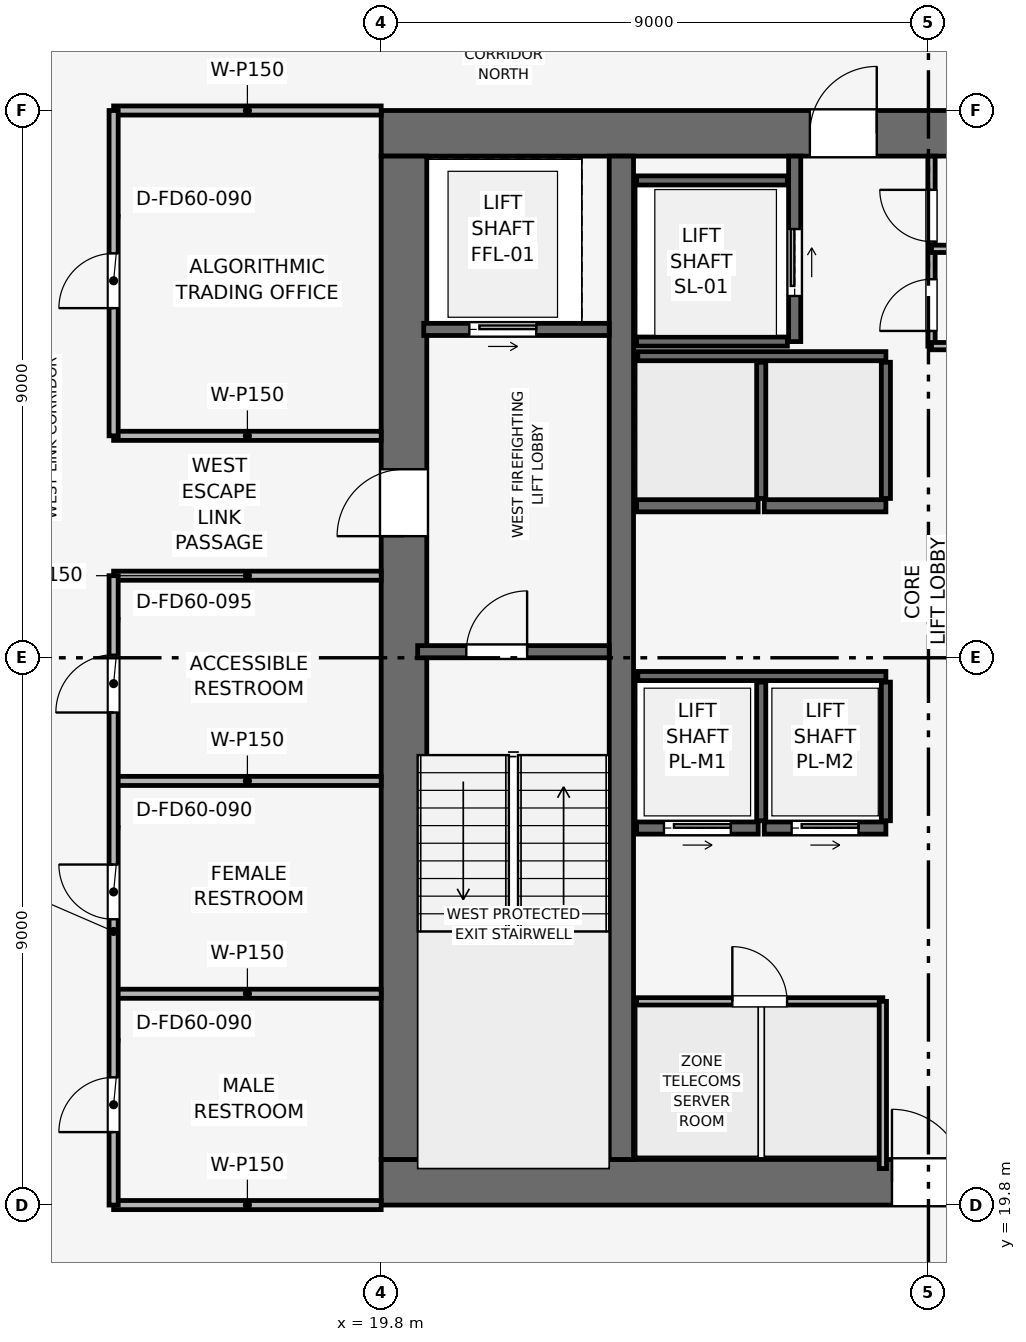
"""IFC4 building model, lengths in metres.
Left out: names, types, materials, properties, quantities, classifications, styles, units other than length and angle.
Written with IfcOpenShell. Run it as: python <this file> out.ifc"""

import sys

from ifc_helpers import new_model, si_unit, direction, frame, frame_2d, origin, place, context, subcontext, project, spatial, rectangle, extrude, element, fill, save


model = new_model("IFC4")
c1 = context("Model", 3, precision=1e-05, world=origin(), true_north=direction((0.0, 1.0)))
c2 = subcontext(c1, "Body", "Model", "MODEL_VIEW")
j1 = project(units=[si_unit("LENGTHUNIT", "METRE"), si_unit("PLANEANGLEUNIT", "RADIAN")], contexts=[c1])
p1 = place(None, origin())
s1 = spatial("IfcSite", under=j1, at=p1, CompositionType="ELEMENT")
p2 = place(p1, origin())
s2 = spatial("IfcBuilding", under=s1, at=p2, CompositionType="ELEMENT")
p3 = place(p2, frame((0.0, 0.0, 233.7)))
s3 = spatial("IfcBuildingStorey", under=s2, at=p3, CompositionType="ELEMENT", Elevation=233.7)
p4 = place(p3, frame((19.8, 20.175, 0.0), z_axis=(0.0, 0.0, 1.0), x_axis=(1.0, 0.0, 0.0)))
e1 = element("IfcWall", 1, at=p4, inside=s3, PredefinedType="SHEAR", context=c2, shape_type="SweptSolid", body=[
    extrude(rectangle(XDim=18.0, YDim=0.75, at=frame_2d((9.0, 0.0))), origin(), (0.0, 0.0, 1.0), 3.75),
])
p5 = place(p4, frame((8.4, 0.0, 0.0)))
e2 = element("IfcOpeningElement", 2, at=p5, cuts=e1, PredefinedType="OPENING", context=c2, shape_type="SweptSolid", body=[
    extrude(rectangle(XDim=1.2, YDim=2.2, at=frame_2d((0.6, 1.1))), frame((0.0, 0.385, 0.0), z_axis=(0.0, -1.0, 0.0), x_axis=(1.0, 0.0, 0.0)), (0.0, 0.0, 1.0), 0.77),
])
p6 = place(p3, frame((19.8, 37.425, 0.0), z_axis=(0.0, 0.0, 1.0), x_axis=(1.0, 0.0, 0.0)))
e3 = element("IfcWall", 3, at=p6, inside=s3, PredefinedType="SHEAR", context=c2, shape_type="SweptSolid", body=[
    extrude(rectangle(XDim=18.0, YDim=0.75, at=frame_2d((9.0, 0.0))), origin(), (0.0, 0.0, 1.0), 3.75),
])
p7 = place(p6, frame((7.05, 0.0, 0.0)))
e4 = element("IfcOpeningElement", 4, at=p7, cuts=e3, PredefinedType="OPENING", context=c2, shape_type="SweptSolid", body=[
    extrude(rectangle(XDim=1.1, YDim=2.15, at=frame_2d((0.55, 1.075))), frame((0.0, 0.385, 0.0), z_axis=(0.0, -1.0, 0.0), x_axis=(1.0, 0.0, 0.0)), (0.0, 0.0, 1.0), 0.77),
])
p8 = place(p3, frame((20.175, 20.55, 0.0), z_axis=(0.0, 0.0, 1.0), x_axis=(0.0, 1.0, 0.0)))
e5 = element("IfcWall", 5, at=p8, inside=s3, PredefinedType="SHEAR", context=c2, shape_type="SweptSolid", body=[
    extrude(rectangle(XDim=16.5, YDim=0.75, at=frame_2d((8.25, 0.0))), origin(), (0.0, 0.0, 1.0), 3.75),
])
p9 = place(p8, frame((10.25, 0.0, 0.0)))
e6 = element("IfcOpeningElement", 6, at=p9, cuts=e5, PredefinedType="OPENING", context=c2, shape_type="SweptSolid", body=[
    extrude(rectangle(XDim=1.1, YDim=2.15, at=frame_2d((0.55, 1.075))), frame((0.0, 0.385, 0.0), z_axis=(0.0, -1.0, 0.0), x_axis=(1.0, 0.0, 0.0)), (0.0, 0.0, 1.0), 0.77),
])
p10 = place(p3, frame((23.75, 20.55, 0.0), z_axis=(0.0, 0.0, 1.0), x_axis=(0.0, 1.0, 0.0)))
e7 = element("IfcWall", 7, at=p10, inside=s3, PredefinedType="SHEAR", context=c2, shape_type="SweptSolid", body=[
    extrude(rectangle(XDim=16.5, YDim=0.4, at=frame_2d((8.25, 0.0))), origin(), (0.0, 0.0, 1.0), 3.75),
])
p11 = place(p3, frame((20.4, 28.9, 0.0), z_axis=(0.0, 0.0, 1.0), x_axis=(1.0, 0.0, 0.0)))
e8 = element("IfcWall", 8, at=p11, inside=s3, PredefinedType="SHEAR", context=c2, shape_type="SweptSolid", body=[
    extrude(rectangle(XDim=3.15, YDim=0.2, at=frame_2d((1.575, 0.0))), origin(), (0.0, 0.0, 1.0), 3.5),
])
p12 = place(p11, frame((0.8, 0.0, 0.0)))
e9 = element("IfcOpeningElement", 9, at=p12, cuts=e8, PredefinedType="OPENING", context=c2, shape_type="SweptSolid", body=[
    extrude(rectangle(XDim=1.0, YDim=2.1, at=frame_2d((0.5, 1.05))), frame((0.0, 0.11, 0.0), z_axis=(0.0, -1.0, 0.0), x_axis=(1.0, 0.0, 0.0)), (0.0, 0.0, 1.0), 0.22),
])
p13 = place(p3, frame((20.5, 34.2, 0.0), z_axis=(0.0, 0.0, 1.0), x_axis=(1.0, 0.0, 0.0)))
e10 = element("IfcWall", 10, at=p13, inside=s3, PredefinedType="SHEAR", context=c2, shape_type="SweptSolid", body=[
    extrude(rectangle(XDim=3.05, YDim=0.2, at=frame_2d((1.525, 0.0))), origin(), (0.0, 0.0, 1.0), 3.5),
])
p14 = place(p13, frame((0.75, 0.0, 0.0)))
e11 = element("IfcOpeningElement", 11, at=p14, cuts=e10, PredefinedType="OPENING", context=c2, shape_type="SweptSolid", body=[
    extrude(rectangle(XDim=1.1, YDim=2.15, at=frame_2d((0.55, 1.075))), frame((0.0, 0.11, 0.0), z_axis=(0.0, -1.0, 0.0), x_axis=(1.0, 0.0, 0.0)), (0.0, 0.0, 1.0), 0.22),
])
p15 = place(p3, frame((26.6, 34.0, 0.0), z_axis=(0.0, 0.0, 1.0), x_axis=(0.0, 1.0, 0.0)))
e12 = element("IfcWall", 12, at=p15, inside=s3, PredefinedType="SHEAR", context=c2, shape_type="SweptSolid", body=[
    extrude(rectangle(XDim=3.05, YDim=0.2, at=frame_2d((1.525, 0.0))), origin(), (0.0, 0.0, 1.0), 3.5),
])
p16 = place(p15, frame((0.75, 0.0, 0.0)))
e13 = element("IfcOpeningElement", 13, at=p16, cuts=e12, PredefinedType="OPENING", context=c2, shape_type="SweptSolid", body=[
    extrude(rectangle(XDim=1.1, YDim=2.15, at=frame_2d((0.55, 1.075))), frame((0.0, 0.11, 0.0), z_axis=(0.0, -1.0, 0.0), x_axis=(1.0, 0.0, 0.0)), (0.0, 0.0, 1.0), 0.22),
])
for number, where, z_axis, x_axis in (
    (14, (24.0, 34.0, 0.0), (0.0, 0.0, 1.0), (1.0, 0.0, 0.0)),
    (15, (24.0, 36.65, 0.0), (0.0, 0.0, 1.0), (1.0, 0.0, 0.0)),
):
    element("IfcWall", number, at=place(p3, frame(where, z_axis=z_axis, x_axis=x_axis)), inside=s3, PredefinedType="SHEAR", context=c2, shape_type="SweptSolid", body=[
        extrude(rectangle(XDim=2.48, YDim=0.15, at=frame_2d((1.24, 0.0))), origin(), (0.0, 0.0, 1.0), 3.5),
    ])
p17 = place(p3, frame((24.0, 26.0, 0.0), z_axis=(0.0, 0.0, 1.0), x_axis=(1.0, 0.0, 0.0)))
e16 = element("IfcWall", 16, at=p17, inside=s3, PredefinedType="SHEAR", context=c2, shape_type="SweptSolid", body=[
    extrude(rectangle(XDim=2.0, YDim=0.2, at=frame_2d((1.0, 0.0))), origin(), (0.0, 0.0, 1.0), 3.5),
])
p18 = place(p17, frame((0.45, 0.0, 0.0)))
e17 = element("IfcOpeningElement", 17, at=p18, cuts=e16, PredefinedType="OPENING", context=c2, shape_type="SweptSolid", body=[
    extrude(rectangle(XDim=1.1, YDim=2.15, at=frame_2d((0.55, 1.075))), frame((0.0, 0.11, 0.0), z_axis=(0.0, -1.0, 0.0), x_axis=(1.0, 0.0, 0.0)), (0.0, 0.0, 1.0), 0.22),
])
p19 = place(p3, frame((26.1, 26.0, 0.0), z_axis=(0.0, 0.0, 1.0), x_axis=(1.0, 0.0, 0.0)))
e18 = element("IfcWall", 18, at=p19, inside=s3, PredefinedType="SHEAR", context=c2, shape_type="SweptSolid", body=[
    extrude(rectangle(XDim=2.0, YDim=0.2, at=frame_2d((1.0, 0.0))), origin(), (0.0, 0.0, 1.0), 3.5),
])
p20 = place(p19, frame((0.45, 0.0, 0.0)))
e19 = element("IfcOpeningElement", 19, at=p20, cuts=e18, PredefinedType="OPENING", context=c2, shape_type="SweptSolid", body=[
    extrude(rectangle(XDim=1.1, YDim=2.15, at=frame_2d((0.55, 1.075))), frame((0.0, 0.11, 0.0), z_axis=(0.0, -1.0, 0.0), x_axis=(1.0, 0.0, 0.0)), (0.0, 0.0, 1.0), 0.22),
])
for number, where, z_axis, x_axis in (
    (20, (24.0, 31.3, 0.0), (0.0, 0.0, 1.0), (1.0, 0.0, 0.0)),
    (21, (26.1, 31.3, 0.0), (0.0, 0.0, 1.0), (1.0, 0.0, 0.0)),
):
    element("IfcWall", number, at=place(p3, frame(where, z_axis=z_axis, x_axis=x_axis)), inside=s3, PredefinedType="SHEAR", context=c2, shape_type="SweptSolid", body=[
        extrude(rectangle(XDim=2.0, YDim=0.2, at=frame_2d((1.0, 0.0))), origin(), (0.0, 0.0, 1.0), 3.5),
    ])
p21 = place(p3, frame((24.02, 28.5, 0.0), z_axis=(0.0, 0.0, 1.0), x_axis=(1.0, 0.0, 0.0)))
e22 = element("IfcWall", 22, at=p21, inside=s3, PredefinedType="SHEAR", context=c2, shape_type="SweptSolid", body=[
    extrude(rectangle(XDim=4.08, YDim=0.15, at=frame_2d((2.04, 0.0))), origin(), (0.0, 0.0, 1.0), 3.5),
])
for number, where, z_axis, x_axis in (
    (23, (26.05, 26.12, 0.0), (0.0, 0.0, 1.0), (0.0, 1.0, 0.0)),
    (24, (28.1, 26.12, 0.0), (0.0, 0.0, 1.0), (0.0, 1.0, 0.0)),
):
    element("IfcWall", number, at=place(p3, frame(where, z_axis=z_axis, x_axis=x_axis)), inside=s3, PredefinedType="SHEAR", context=c2, shape_type="SweptSolid", body=[
        extrude(rectangle(XDim=2.28, YDim=0.15, at=frame_2d((1.14, 0.0))), origin(), (0.0, 0.0, 1.0), 3.5),
    ])
p22 = place(p3, frame((24.02, 33.76, 0.0), z_axis=(0.0, 0.0, 1.0), x_axis=(1.0, 0.0, 0.0)))
e25 = element("IfcWall", 25, at=p22, inside=s3, PredefinedType="SHEAR", context=c2, shape_type="SweptSolid", body=[
    extrude(rectangle(XDim=4.08, YDim=0.15, at=frame_2d((2.04, 0.0))), origin(), (0.0, 0.0, 1.0), 3.5),
])
for number, where, z_axis, x_axis in (
    (26, (26.05, 31.42, 0.0), (0.0, 0.0, 1.0), (0.0, 1.0, 0.0)),
    (27, (28.1, 31.42, 0.0), (0.0, 0.0, 1.0), (0.0, 1.0, 0.0)),
):
    element("IfcWall", number, at=place(p3, frame(where, z_axis=z_axis, x_axis=x_axis)), inside=s3, PredefinedType="SHEAR", context=c2, shape_type="SweptSolid", body=[
        extrude(rectangle(XDim=2.24, YDim=0.15, at=frame_2d((1.12, 0.0))), origin(), (0.0, 0.0, 1.0), 3.5),
    ])
p23 = place(p3, frame((28.85, 33.925, 0.0), z_axis=(0.0, 0.0, 1.0), x_axis=(0.0, 1.0, 0.0)))
e28 = element("IfcWall", 28, at=p23, inside=s3, PredefinedType="PARTITIONING", context=c2, shape_type="SweptSolid", body=[
    extrude(rectangle(XDim=3.125, YDim=0.12, at=frame_2d((1.562, 0.0))), origin(), (0.0, 0.0, 1.0), 3.5),
])
p24 = place(p23, frame((0.25, 0.0, 0.0)))
e29 = element("IfcOpeningElement", 29, at=p24, cuts=e28, PredefinedType="OPENING", context=c2, shape_type="SweptSolid", body=[
    extrude(rectangle(XDim=0.85, YDim=2.1, at=frame_2d((0.425, 1.05))), frame((0.0, 0.07, 0.0), z_axis=(0.0, -1.0, 0.0), x_axis=(1.0, 0.0, 0.0)), (0.0, 0.0, 1.0), 0.14),
])
p25 = place(p23, frame((1.72, 0.0, 0.0)))
e30 = element("IfcOpeningElement", 30, at=p25, cuts=e28, PredefinedType="OPENING", context=c2, shape_type="SweptSolid", body=[
    extrude(rectangle(XDim=0.85, YDim=2.1, at=frame_2d((0.425, 1.05))), frame((0.0, 0.07, 0.0), z_axis=(0.0, -1.0, 0.0), x_axis=(1.0, 0.0, 0.0)), (0.0, 0.0, 1.0), 0.14),
])
for number, where, z_axis, x_axis in (
    (31, (28.85, 35.525, 0.0), (0.0, 0.0, 1.0), (1.0, 0.0, 0.0)),
    (32, (28.85, 33.925, 0.0), (0.0, 0.0, 1.0), (1.0, 0.0, 0.0)),
):
    element("IfcWall", number, at=place(p3, frame(where, z_axis=z_axis, x_axis=x_axis)), inside=s3, PredefinedType="PARTITIONING", context=c2, shape_type="SweptSolid", body=[
        extrude(rectangle(XDim=3.3, YDim=0.12, at=frame_2d((1.65, 0.0))), origin(), (0.0, 0.0, 1.0), 3.5),
    ])
p26 = place(p3, frame((24.0, 23.15, 0.0), z_axis=(0.0, 0.0, 1.0), x_axis=(1.0, 0.0, 0.0)))
e33 = element("IfcWall", 33, at=p26, inside=s3, PredefinedType="PARTITIONING", context=c2, shape_type="SweptSolid", body=[
    extrude(rectangle(XDim=4.05, YDim=0.12, at=frame_2d((2.025, 0.0))), origin(), (0.0, 0.0, 1.0), 3.5),
])
p27 = place(p26, frame((1.575, 0.0, 0.0)))
e34 = element("IfcOpeningElement", 34, at=p27, cuts=e33, PredefinedType="OPENING", context=c2, shape_type="SweptSolid", body=[
    extrude(rectangle(XDim=0.9, YDim=2.1, at=frame_2d((0.45, 1.05))), frame((0.0, 0.07, 0.0), z_axis=(0.0, -1.0, 0.0), x_axis=(1.0, 0.0, 0.0)), (0.0, 0.0, 1.0), 0.14),
])
p28 = place(p3, frame((28.05, 20.4, 0.0), z_axis=(0.0, 0.0, 1.0), x_axis=(0.0, 1.0, 0.0)))
e35 = element("IfcWall", 35, at=p28, inside=s3, PredefinedType="PARTITIONING", context=c2, shape_type="SweptSolid", body=[
    extrude(rectangle(XDim=2.75, YDim=0.12, at=frame_2d((1.375, 0.0))), origin(), (0.0, 0.0, 1.0), 3.5),
])
p29 = place(p3, frame((15.4, 19.8, 0.0), z_axis=(0.0, 0.0, 1.0), x_axis=(1.0, 0.0, 0.0)))
e36 = element("IfcWall", 36, at=p29, inside=s3, PredefinedType="PARTITIONING", context=c2, shape_type="SweptSolid", body=[
    extrude(rectangle(XDim=4.4, YDim=0.15, at=frame_2d((2.2, 0.0))), origin(), (0.0, 0.0, 1.0), 3.035),
])
for number, where, z_axis, x_axis in (
    (37, (15.4, 23.275, 0.0), (0.0, 0.0, 1.0), (1.0, 0.0, 0.0)),
    (38, (15.4, 26.775, 0.0), (0.0, 0.0, 1.0), (1.0, 0.0, 0.0)),
    (39, (15.4, 30.15, 0.0), (0.0, 0.0, 1.0), (1.0, 0.0, 0.0)),
    (40, (15.4, 32.45, 0.0), (0.0, 0.0, 1.0), (1.0, 0.0, 0.0)),
):
    element("IfcWall", number, at=place(p3, frame(where, z_axis=z_axis, x_axis=x_axis)), inside=s3, PredefinedType="PARTITIONING", context=c2, shape_type="SweptSolid", body=[
        extrude(rectangle(XDim=4.4, YDim=0.15, at=frame_2d((2.2, 0.0))), origin(), (0.0, 0.0, 1.0), 3.5),
    ])
p30 = place(p3, frame((15.4, 37.8, 0.0), z_axis=(0.0, 0.0, 1.0), x_axis=(1.0, 0.0, 0.0)))
e41 = element("IfcWall", 41, at=p30, inside=s3, PredefinedType="PARTITIONING", context=c2, shape_type="SweptSolid", body=[
    extrude(rectangle(XDim=4.4, YDim=0.15, at=frame_2d((2.2, 0.0))), origin(), (0.0, 0.0, 1.0), 3.035),
])
p31 = place(p3, frame((15.4, 19.8, 0.0), z_axis=(0.0, 0.0, 1.0), x_axis=(0.0, 1.0, 0.0)))
e42 = element("IfcWall", 42, at=p31, inside=s3, PredefinedType="PARTITIONING", context=c2, shape_type="SweptSolid", body=[
    extrude(rectangle(XDim=10.35, YDim=0.15, at=frame_2d((5.175, 0.0))), origin(), (0.0, 0.0, 1.0), 3.035),
])
p32 = place(p31, frame((1.2, 0.0, 0.0)))
e43 = element("IfcOpeningElement", 43, at=p32, cuts=e42, PredefinedType="OPENING", context=c2, shape_type="SweptSolid", body=[
    extrude(rectangle(XDim=0.9, YDim=2.1, at=frame_2d((0.45, 1.05))), frame((0.0, 0.085, 0.0), z_axis=(0.0, -1.0, 0.0), x_axis=(1.0, 0.0, 0.0)), (0.0, 0.0, 1.0), 0.17),
])
p33 = place(p31, frame((4.7, 0.0, 0.0)))
e44 = element("IfcOpeningElement", 44, at=p33, cuts=e42, PredefinedType="OPENING", context=c2, shape_type="SweptSolid", body=[
    extrude(rectangle(XDim=0.9, YDim=2.1, at=frame_2d((0.45, 1.05))), frame((0.0, 0.085, 0.0), z_axis=(0.0, -1.0, 0.0), x_axis=(1.0, 0.0, 0.0)), (0.0, 0.0, 1.0), 0.17),
])
p34 = place(p31, frame((8.1, 0.0, 0.0)))
e45 = element("IfcOpeningElement", 45, at=p34, cuts=e42, PredefinedType="OPENING", context=c2, shape_type="SweptSolid", body=[
    extrude(rectangle(XDim=0.95, YDim=2.1, at=frame_2d((0.475, 1.05))), frame((0.0, 0.085, 0.0), z_axis=(0.0, -1.0, 0.0), x_axis=(1.0, 0.0, 0.0)), (0.0, 0.0, 1.0), 0.17),
])
p35 = place(p3, frame((15.4, 32.45, 0.0), z_axis=(0.0, 0.0, 1.0), x_axis=(0.0, 1.0, 0.0)))
e46 = element("IfcWall", 46, at=p35, inside=s3, PredefinedType="PARTITIONING", context=c2, shape_type="SweptSolid", body=[
    extrude(rectangle(XDim=5.35, YDim=0.15, at=frame_2d((2.675, 0.0))), origin(), (0.0, 0.0, 1.0), 3.035),
])
p36 = place(p35, frame((2.1, 0.0, 0.0)))
e47 = element("IfcOpeningElement", 47, at=p36, cuts=e46, PredefinedType="OPENING", context=c2, shape_type="SweptSolid", body=[
    extrude(rectangle(XDim=0.9, YDim=2.1, at=frame_2d((0.45, 1.05))), frame((0.0, 0.085, 0.0), z_axis=(0.0, -1.0, 0.0), x_axis=(1.0, 0.0, 0.0)), (0.0, 0.0, 1.0), 0.17),
])
p37 = place(p12, origin())
e48 = element("IfcDoor", 48, at=p37, inside=s3, OperationType="SINGLE_SWING_RIGHT", PredefinedType="DOOR", context=c2, shape_type="SweptSolid", body=[
    extrude(rectangle(XDim=1.0, YDim=2.1, at=frame_2d((0.5, 1.05))), frame((0.0, 0.025, 0.0), z_axis=(0.0, -1.0, 0.0), x_axis=(1.0, 0.0, 0.0)), (0.0, 0.0, 1.0), 0.05),
])
fill(e9, e48)
p38 = place(p14, origin())
e49 = element("IfcDoor", 49, at=p38, inside=s3, OperationType="SLIDING_TO_RIGHT", PredefinedType="DOOR", context=c2, shape_type="SweptSolid", body=[
    extrude(rectangle(XDim=1.1, YDim=2.15, at=frame_2d((0.55, 1.075))), frame((0.0, 0.025, 0.0), z_axis=(0.0, -1.0, 0.0), x_axis=(1.0, 0.0, 0.0)), (0.0, 0.0, 1.0), 0.05),
])
fill(e11, e49)
p39 = place(p16, origin())
e50 = element("IfcDoor", 50, at=p39, inside=s3, OperationType="SLIDING_TO_RIGHT", PredefinedType="DOOR", context=c2, shape_type="SweptSolid", body=[
    extrude(rectangle(XDim=1.1, YDim=2.15, at=frame_2d((0.55, 1.075))), frame((0.0, 0.025, 0.0), z_axis=(0.0, -1.0, 0.0), x_axis=(1.0, 0.0, 0.0)), (0.0, 0.0, 1.0), 0.05),
])
fill(e13, e50)
p40 = place(p18, origin())
e51 = element("IfcDoor", 51, at=p40, inside=s3, OperationType="SLIDING_TO_RIGHT", PredefinedType="DOOR", context=c2, shape_type="SweptSolid", body=[
    extrude(rectangle(XDim=1.1, YDim=2.15, at=frame_2d((0.55, 1.075))), frame((0.0, 0.025, 0.0), z_axis=(0.0, -1.0, 0.0), x_axis=(1.0, 0.0, 0.0)), (0.0, 0.0, 1.0), 0.05),
])
fill(e17, e51)
p41 = place(p20, origin())
e52 = element("IfcDoor", 52, at=p41, inside=s3, OperationType="SLIDING_TO_RIGHT", PredefinedType="DOOR", context=c2, shape_type="SweptSolid", body=[
    extrude(rectangle(XDim=1.1, YDim=2.15, at=frame_2d((0.55, 1.075))), frame((0.0, 0.025, 0.0), z_axis=(0.0, -1.0, 0.0), x_axis=(1.0, 0.0, 0.0)), (0.0, 0.0, 1.0), 0.05),
])
fill(e19, e52)
p42 = place(p24, origin())
e53 = element("IfcDoor", 53, at=p42, inside=s3, OperationType="SINGLE_SWING_LEFT", PredefinedType="DOOR", context=c2, shape_type="SweptSolid", body=[
    extrude(rectangle(XDim=0.85, YDim=2.1, at=frame_2d((0.425, 1.05))), frame((0.0, 0.025, 0.0), z_axis=(0.0, -1.0, 0.0), x_axis=(1.0, 0.0, 0.0)), (0.0, 0.0, 1.0), 0.05),
])
fill(e29, e53)
p43 = place(p25, origin())
e54 = element("IfcDoor", 54, at=p43, inside=s3, OperationType="SINGLE_SWING_RIGHT", PredefinedType="DOOR", context=c2, shape_type="SweptSolid", body=[
    extrude(rectangle(XDim=0.85, YDim=2.1, at=frame_2d((0.425, 1.05))), frame((0.0, 0.025, 0.0), z_axis=(0.0, -1.0, 0.0), x_axis=(1.0, 0.0, 0.0)), (0.0, 0.0, 1.0), 0.05),
])
fill(e30, e54)
p44 = place(p27, origin())
e55 = element("IfcDoor", 55, at=p44, inside=s3, OperationType="SINGLE_SWING_LEFT", PredefinedType="DOOR", context=c2, shape_type="SweptSolid", body=[
    extrude(rectangle(XDim=0.9, YDim=2.1, at=frame_2d((0.45, 1.05))), frame((0.0, 0.025, 0.0), z_axis=(0.0, -1.0, 0.0), x_axis=(1.0, 0.0, 0.0)), (0.0, 0.0, 1.0), 0.05),
])
fill(e34, e55)
p45 = place(p32, origin())
e56 = element("IfcDoor", 56, at=p45, inside=s3, OperationType="SINGLE_SWING_LEFT", PredefinedType="DOOR", context=c2, shape_type="SweptSolid", body=[
    extrude(rectangle(XDim=0.9, YDim=2.1, at=frame_2d((0.45, 1.05))), frame((0.0, 0.025, 0.0), z_axis=(0.0, -1.0, 0.0), x_axis=(1.0, 0.0, 0.0)), (0.0, 0.0, 1.0), 0.05),
])
fill(e43, e56)
p46 = place(p33, origin())
e57 = element("IfcDoor", 57, at=p46, inside=s3, OperationType="SINGLE_SWING_RIGHT", PredefinedType="DOOR", context=c2, shape_type="SweptSolid", body=[
    extrude(rectangle(XDim=0.9, YDim=2.1, at=frame_2d((0.45, 1.05))), frame((0.0, 0.025, 0.0), z_axis=(0.0, -1.0, 0.0), x_axis=(1.0, 0.0, 0.0)), (0.0, 0.0, 1.0), 0.05),
])
fill(e44, e57)
p47 = place(p34, origin())
e58 = element("IfcDoor", 58, at=p47, inside=s3, OperationType="SINGLE_SWING_LEFT", PredefinedType="DOOR", context=c2, shape_type="SweptSolid", body=[
    extrude(rectangle(XDim=0.95, YDim=2.1, at=frame_2d((0.475, 1.05))), frame((0.0, 0.025, 0.0), z_axis=(0.0, -1.0, 0.0), x_axis=(1.0, 0.0, 0.0)), (0.0, 0.0, 1.0), 0.05),
])
fill(e45, e58)
p48 = place(p36, origin())
e59 = element("IfcDoor", 59, at=p48, inside=s3, OperationType="SINGLE_SWING_LEFT", PredefinedType="DOOR", context=c2, shape_type="SweptSolid", body=[
    extrude(rectangle(XDim=0.9, YDim=2.1, at=frame_2d((0.45, 1.05))), frame((0.0, 0.025, 0.0), z_axis=(0.0, -1.0, 0.0), x_axis=(1.0, 0.0, 0.0)), (0.0, 0.0, 1.0), 0.05),
])
fill(e47, e59)
p49 = place(p9, origin())
e60 = element("IfcDoor", 60, at=p49, inside=s3, OperationType="SINGLE_SWING_LEFT", PredefinedType="DOOR", context=c2, shape_type="SweptSolid", body=[
    extrude(rectangle(XDim=1.1, YDim=2.15, at=frame_2d((0.55, 1.075))), frame((0.0, 0.025, 0.0), z_axis=(0.0, -1.0, 0.0), x_axis=(1.0, 0.0, 0.0)), (0.0, 0.0, 1.0), 0.05),
])
fill(e6, e60)
p50 = place(p5, origin())
e61 = element("IfcDoor", 61, at=p50, inside=s3, OperationType="SINGLE_SWING_LEFT", PredefinedType="DOOR", context=c2, shape_type="SweptSolid", body=[
    extrude(rectangle(XDim=1.2, YDim=2.2, at=frame_2d((0.6, 1.1))), frame((0.0, 0.025, 0.0), z_axis=(0.0, -1.0, 0.0), x_axis=(1.0, 0.0, 0.0)), (0.0, 0.0, 1.0), 0.05),
])
fill(e2, e61)
p51 = place(p7, origin())
e62 = element("IfcDoor", 62, at=p51, inside=s3, OperationType="SINGLE_SWING_RIGHT", PredefinedType="DOOR", context=c2, shape_type="SweptSolid", body=[
    extrude(rectangle(XDim=1.1, YDim=2.15, at=frame_2d((0.55, 1.075))), frame((0.0, 0.025, 0.0), z_axis=(0.0, -1.0, 0.0), x_axis=(1.0, 0.0, 0.0)), (0.0, 0.0, 1.0), 0.05),
])
fill(e4, e62)
save(model, sys.argv[1])
